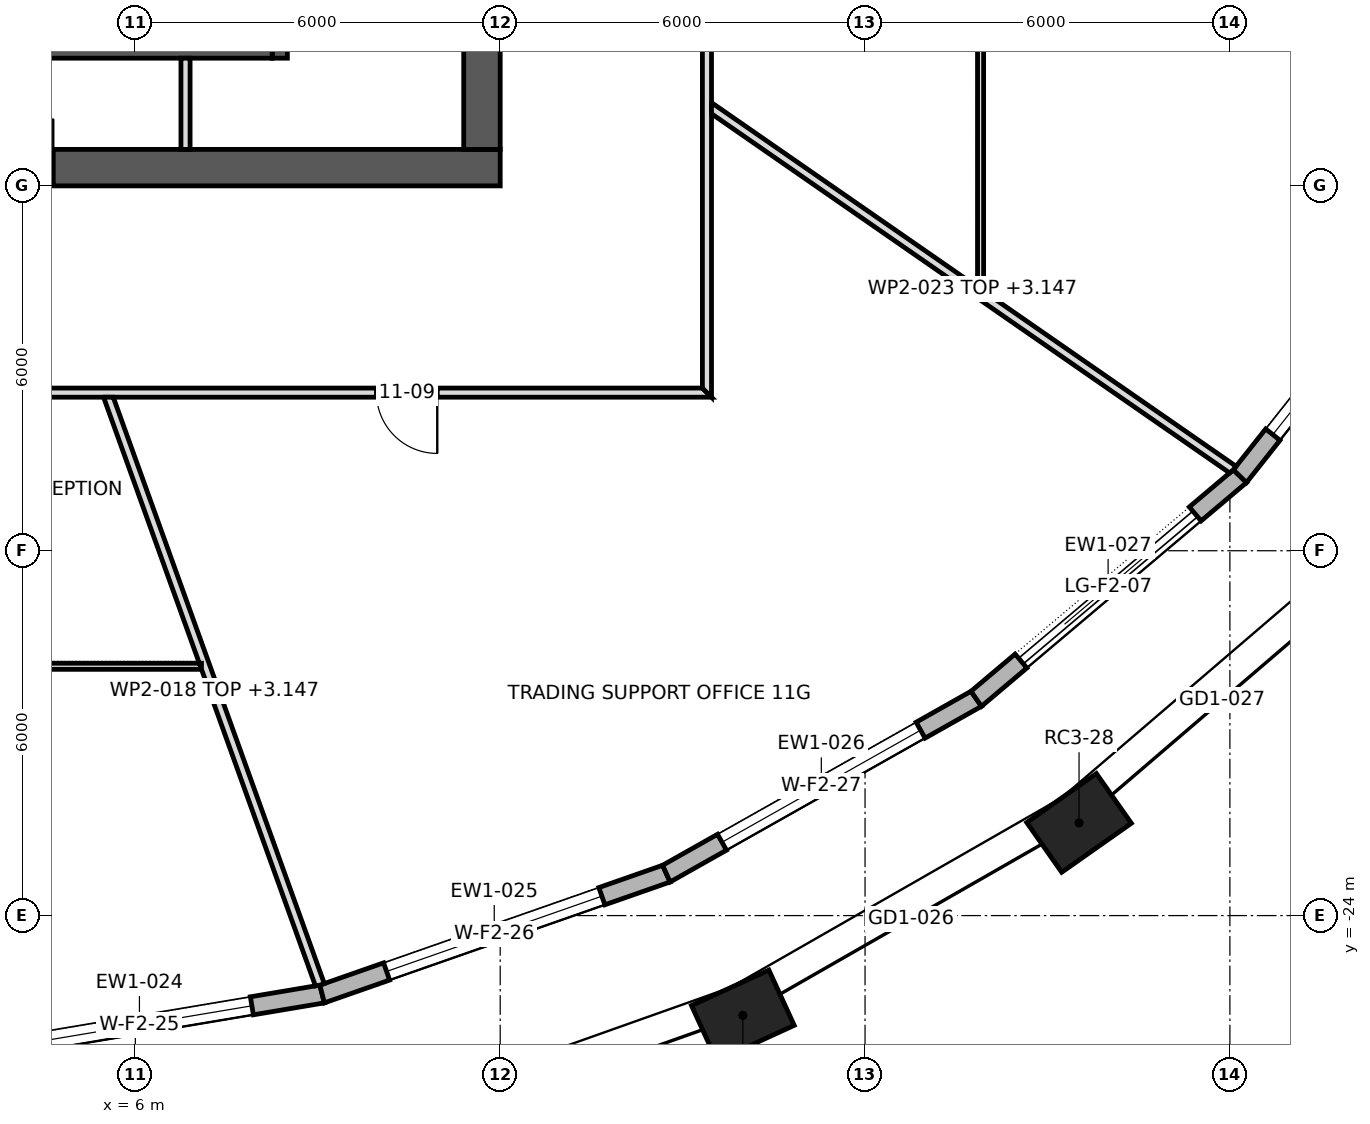
"""IFC4 building model, lengths in metres.
Left out: names, types, materials, properties, quantities, classifications, styles, units other than length and angle.
Written with IfcOpenShell. Run it as: python <this file> out.ifc"""

import sys

from ifc_helpers import new_model, si_unit, direction, frame, frame_2d, origin, origin_2d, place, context, subcontext, project, spatial, polyline, rectangle, outline, extrude, element, fill, save


model = new_model("IFC4")
c1 = context("Model", 3, precision=1e-05, world=origin(), true_north=direction((0.0, 1.0)))
c2 = subcontext(c1, "Body", "Model", "MODEL_VIEW")
j1 = project(units=[si_unit("LENGTHUNIT", "METRE"), si_unit("PLANEANGLEUNIT", "RADIAN")], contexts=[c1])
p1 = place(None, origin())
s1 = spatial("IfcSite", under=j1, at=p1, CompositionType="ELEMENT")
p2 = place(p1, origin())
s2 = spatial("IfcBuilding", under=s1, at=p2, CompositionType="ELEMENT")
p3 = place(p2, frame((0.0, 0.0, 154.9)))
s3 = spatial("IfcBuildingStorey", under=s2, at=p3, CompositionType="ELEMENT", Elevation=154.9)
for number, where, z_axis, x_axis in (
    (1, (15.99, -25.642, 0.0), (0.0, 0.0, 1.0), (0.909, 0.417, 0.0)),
    (2, (21.519, -22.475, 0.0), (0.0, 0.0, 1.0), (0.818, 0.575, 0.0)),
):
    element("IfcColumn", number, at=place(p3, frame(where, z_axis=z_axis, x_axis=x_axis)), inside=s3, PredefinedType="COLUMN", context=c2, shape_type="SweptSolid", body=[
        extrude(rectangle(XDim=1.4, YDim=1.0, at=origin_2d()), origin(), (0.0, 0.0, 1.0), 4.2),
    ])
p4 = place(p3, frame((-12.0, -11.7, 0.0), z_axis=(0.0, 0.0, 1.0), x_axis=(1.0, 0.0, 0.0)))
e3 = element("IfcWall", 3, at=p4, inside=s3, PredefinedType="SHEAR", context=c2, shape_type="SweptSolid", body=[
    extrude(rectangle(XDim=24.0, YDim=0.6, at=frame_2d((12.0, 0.0))), origin(), (0.0, 0.0, 1.0), 4.2),
])
p5 = place(p4, frame((9.975, 0.0, 0.0)))
e4 = element("IfcOpeningElement", 4, at=p5, cuts=e3, PredefinedType="OPENING", context=c2, shape_type="SweptSolid", body=[
    extrude(rectangle(XDim=0.9, YDim=2.1, at=frame_2d((0.45, 1.05))), frame((0.0, 0.312, 0.0), z_axis=(0.0, -1.0, 0.0), x_axis=(1.0, 0.0, 0.0)), (0.0, 0.0, 1.0), 0.624),
])
p6 = place(p4, frame((4.6, 0.0, 0.0)))
e5 = element("IfcOpeningElement", 5, at=p6, cuts=e3, PredefinedType="OPENING", context=c2, shape_type="SweptSolid", body=[
    extrude(rectangle(XDim=0.8, YDim=2.1, at=frame_2d((0.4, 1.05))), frame((0.0, 0.312, 0.0), z_axis=(0.0, -1.0, 0.0), x_axis=(1.0, 0.0, 0.0)), (0.0, 0.0, 1.0), 0.624),
])
p7 = place(p4, frame((7.0, 0.0, 0.0)))
e6 = element("IfcOpeningElement", 6, at=p7, cuts=e3, PredefinedType="OPENING", context=c2, shape_type="SweptSolid", body=[
    extrude(rectangle(XDim=0.8, YDim=2.1, at=frame_2d((0.4, 1.05))), frame((0.0, 0.312, 0.0), z_axis=(0.0, -1.0, 0.0), x_axis=(1.0, 0.0, 0.0)), (0.0, 0.0, 1.0), 0.624),
])
p8 = place(p4, frame((15.85, 0.0, 0.0)))
e7 = element("IfcOpeningElement", 7, at=p8, cuts=e3, PredefinedType="OPENING", context=c2, shape_type="SweptSolid", body=[
    extrude(rectangle(XDim=0.8, YDim=2.1, at=frame_2d((0.4, 1.05))), frame((0.0, 0.312, 0.0), z_axis=(0.0, -1.0, 0.0), x_axis=(1.0, 0.0, 0.0)), (0.0, 0.0, 1.0), 0.624),
])
p9 = place(p3, frame((11.7, -11.4, 0.0), z_axis=(0.0, 0.0, 1.0), x_axis=(0.0, 1.0, 0.0)))
e8 = element("IfcWall", 8, at=p9, inside=s3, PredefinedType="SHEAR", context=c2, shape_type="SweptSolid", body=[
    extrude(rectangle(XDim=22.8, YDim=0.6, at=frame_2d((11.4, 0.0))), origin(), (0.0, 0.0, 1.0), 4.2),
])
p10 = place(p9, frame((10.2, 0.0, 0.0)))
e9 = element("IfcOpeningElement", 9, at=p10, cuts=e8, PredefinedType="OPENING", context=c2, shape_type="SweptSolid", body=[
    extrude(rectangle(XDim=2.4, YDim=2.1, at=frame_2d((1.2, 1.05))), frame((0.0, 0.312, 0.0), z_axis=(0.0, -1.0, 0.0), x_axis=(1.0, 0.0, 0.0)), (0.0, 0.0, 1.0), 0.624),
])
p11 = place(p9, frame((19.5, 0.0, 0.0)))
e10 = element("IfcOpeningElement", 10, at=p11, cuts=e8, PredefinedType="OPENING", context=c2, shape_type="SweptSolid", body=[
    extrude(rectangle(XDim=1.2, YDim=2.1, at=frame_2d((0.6, 1.05))), frame((0.0, 0.312, 0.0), z_axis=(0.0, -1.0, 0.0), x_axis=(1.0, 0.0, 0.0)), (0.0, 0.0, 1.0), 0.624),
])
p12 = place(p9, frame((2.1, 0.0, 0.0)))
e11 = element("IfcOpeningElement", 11, at=p12, cuts=e8, PredefinedType="OPENING", context=c2, shape_type="SweptSolid", body=[
    extrude(rectangle(XDim=1.2, YDim=2.1, at=frame_2d((0.6, 1.05))), frame((0.0, 0.312, 0.0), z_axis=(0.0, -1.0, 0.0), x_axis=(1.0, 0.0, 0.0)), (0.0, 0.0, 1.0), 0.624),
])
p13 = place(p3, frame((3.063, -26.299, 0.0), z_axis=(0.0, 0.0, 1.0), x_axis=(0.98618955457, 0.165620537547, 0.0)))
e12 = element("IfcWall", 12, at=p13, inside=s3, PredefinedType="STANDARD", context=c2, shape_type="SweptSolid", body=[
    extrude(outline(polyline([(-0.012, -0.15), (6.105, -0.15), (6.08, 0.15), (0.012, 0.15), (-0.012, -0.15)])), origin(), (0.0, 0.0, 1.0), 3.9),
])
p14 = place(p13, frame((1.171, 0.0, 0.6)))
e13 = element("IfcOpeningElement", 13, at=p14, cuts=e12, PredefinedType="OPENING", context=c2, shape_type="SweptSolid", body=[
    extrude(rectangle(XDim=3.75, YDim=2.85, at=frame_2d((1.875, 1.425))), frame((0.0, 0.162, 0.0), z_axis=(0.0, -1.0, 0.0), x_axis=(1.0, 0.0, 0.0)), (0.0, 0.0, 1.0), 0.324),
])
p15 = place(p3, frame((9.071, -25.29, 0.0), z_axis=(0.0, 0.0, 1.0), x_axis=(0.943944636678, 0.330103806228, 0.0)))
e14 = element("IfcWall", 14, at=p15, inside=s3, PredefinedType="STANDARD", context=c2, shape_type="SweptSolid", body=[
    extrude(outline(polyline([(-0.013, -0.15), (6.011, -0.15), (5.984, 0.15), (0.013, 0.15), (-0.013, -0.15)])), origin(), (0.0, 0.0, 1.0), 3.9),
])
p16 = place(p15, frame((1.124, 0.0, 0.6)))
e15 = element("IfcOpeningElement", 15, at=p16, cuts=e14, PredefinedType="OPENING", context=c2, shape_type="SweptSolid", body=[
    extrude(rectangle(XDim=3.75, YDim=2.85, at=frame_2d((1.875, 1.425))), frame((0.0, 0.162, 0.0), z_axis=(0.0, -1.0, 0.0), x_axis=(1.0, 0.0, 0.0)), (0.0, 0.0, 1.0), 0.324),
])
p17 = place(p3, frame((14.732, -23.31, 0.0), z_axis=(0.0, 0.0, 1.0), x_axis=(0.870982130072, 0.491314694565, 0.0)))
e16 = element("IfcWall", 16, at=p17, inside=s3, PredefinedType="STANDARD", context=c2, shape_type="SweptSolid", body=[
    extrude(outline(polyline([(-0.013, -0.15), (5.866, -0.15), (5.837, 0.15), (0.013, 0.15), (-0.013, -0.15)])), origin(), (0.0, 0.0, 1.0), 3.9),
])
p18 = place(p17, frame((1.051, 0.0, 0.6)))
e17 = element("IfcOpeningElement", 17, at=p18, cuts=e16, PredefinedType="OPENING", context=c2, shape_type="SweptSolid", body=[
    extrude(rectangle(XDim=3.75, YDim=2.85, at=frame_2d((1.875, 1.425))), frame((0.0, 0.162, 0.0), z_axis=(0.0, -1.0, 0.0), x_axis=(1.0, 0.0, 0.0)), (0.0, 0.0, 1.0), 0.324),
])
p19 = place(p3, frame((19.829, -20.435, 0.0), z_axis=(0.0, 0.0, 1.0), x_axis=(0.764076096085, 0.645126126732, 0.0)))
e18 = element("IfcWall", 18, at=p19, inside=s3, PredefinedType="STANDARD", context=c2, shape_type="SweptSolid", body=[
    extrude(outline(polyline([(-0.014, -0.15), (5.69, -0.15), (5.66, 0.15), (0.014, 0.15), (-0.014, -0.15)])), origin(), (0.0, 0.0, 1.0), 3.9),
])
p20 = place(p19, frame((0.962, 0.0, 0.0)))
e19 = element("IfcOpeningElement", 19, at=p20, cuts=e18, PredefinedType="OPENING", context=c2, shape_type="SweptSolid", body=[
    extrude(rectangle(XDim=3.75, YDim=3.45, at=frame_2d((1.875, 1.725))), frame((0.0, 0.162, 0.0), z_axis=(0.0, -1.0, 0.0), x_axis=(1.0, 0.0, 0.0)), (0.0, 0.0, 1.0), 0.324),
])
p21 = place(p3, frame((24.165, -16.774, 0.0), z_axis=(0.0, 0.0, 1.0), x_axis=(0.620577705153, 0.784144955902, 0.0)))
e20 = element("IfcWall", 20, at=p21, inside=s3, PredefinedType="STANDARD", context=c2, shape_type="SweptSolid", body=[
    extrude(outline(polyline([(-0.015, -0.15), (5.509, -0.15), (5.477, 0.15), (0.015, 0.15), (-0.015, -0.15)])), origin(), (0.0, 0.0, 1.0), 3.9),
])
p22 = place(p21, frame((0.871, 0.0, 0.6)))
e21 = element("IfcOpeningElement", 21, at=p22, cuts=e20, PredefinedType="OPENING", context=c2, shape_type="SweptSolid", body=[
    extrude(rectangle(XDim=3.75, YDim=2.85, at=frame_2d((1.875, 1.425))), frame((0.0, 0.162, 0.0), z_axis=(0.0, -1.0, 0.0), x_axis=(1.0, 0.0, 0.0)), (0.0, 0.0, 1.0), 0.324),
])
p23 = place(p3, frame((8.375, -9.9, 0.0), z_axis=(0.0, 0.0, 1.0), x_axis=(0.0, 1.0, 0.0)))
e22 = element("IfcWall", 22, at=p23, inside=s3, PredefinedType="SHEAR", context=c2, shape_type="SweptSolid", body=[
    extrude(rectangle(XDim=3.4, YDim=0.25, at=frame_2d((1.7, 0.0))), origin(), (0.0, 0.0, 1.0), 3.9),
])
p24 = place(p23, frame((1.175, 0.0, 0.0)))
e23 = element("IfcOpeningElement", 23, at=p24, cuts=e22, PredefinedType="OPENING", context=c2, shape_type="SweptSolid", body=[
    extrude(rectangle(XDim=1.2, YDim=2.1, at=frame_2d((0.6, 1.05))), frame((0.0, 0.137, 0.0), z_axis=(0.0, -1.0, 0.0), x_axis=(1.0, 0.0, 0.0)), (0.0, 0.0, 1.0), 0.274),
])
p25 = place(p3, frame((0.25, -9.825, 0.0), z_axis=(0.0, 0.0, 1.0), x_axis=(1.0, 0.0, 0.0)))
e24 = element("IfcWall", 24, at=p25, inside=s3, PredefinedType="SHEAR", context=c2, shape_type="SweptSolid", body=[
    extrude(rectangle(XDim=8.0, YDim=0.15, at=frame_2d((4.0, 0.0))), origin(), (0.0, 0.0, 1.0), 3.9),
])
p26 = place(p3, frame((6.825, -11.4, 0.0), z_axis=(0.0, 0.0, 1.0), x_axis=(0.0, 1.0, 0.0)))
e25 = element("IfcWall", 25, at=p26, inside=s3, PredefinedType="PARTITIONING", context=c2, shape_type="SweptSolid", body=[
    extrude(rectangle(XDim=1.5, YDim=0.15, at=frame_2d((0.75, 0.0))), origin(), (0.0, 0.0, 1.0), 3.9),
])
p27 = place(p3, frame((-15.475, -15.4, 0.0), z_axis=(0.0, 0.0, 1.0), x_axis=(1.0, 0.0, 0.0)))
e26 = element("IfcWall", 26, at=p27, inside=s3, PredefinedType="PARTITIONING", context=c2, shape_type="SweptSolid", body=[
    extrude(outline(polyline([(0.0, -0.075), (1.935, -0.075), (3.869, -0.075), (5.803, -0.075), (7.738, -0.075), (9.672, -0.075), (11.606, -0.075), (13.541, -0.075), (15.475, -0.075), (17.409, -0.075), (19.344, -0.075), (21.278, -0.075), (23.212, -0.075), (25.147, -0.075), (27.081, -0.075), (29.016, -0.075), (30.95, -0.075), (30.8, 0.075), (28.885, 0.075), (26.969, 0.075), (25.053, 0.075), (23.138, 0.075), (21.222, 0.075), (19.306, 0.075), (17.391, 0.075), (15.475, 0.075), (13.56, 0.075), (11.644, 0.075), (9.728, 0.075), (7.812, 0.075), (5.897, 0.075), (3.981, 0.075), (2.066, 0.075), (0.15, 0.075), (0.0, -0.075)])), origin(), (0.0, 0.0, 1.0), 3.9),
])
p28 = place(p27, frame((11.785, 0.0, 0.0)))
e27 = element("IfcOpeningElement", 27, at=p28, cuts=e26, PredefinedType="OPENING", context=c2, shape_type="SweptSolid", body=[
    extrude(rectangle(XDim=1.0, YDim=2.1, at=frame_2d((0.5, 1.05))), frame((0.0, 0.087, 0.0), z_axis=(0.0, -1.0, 0.0), x_axis=(1.0, 0.0, 0.0)), (0.0, 0.0, 1.0), 0.174),
])
p29 = place(p27, frame((17.315, 0.0, 0.0)))
e28 = element("IfcOpeningElement", 28, at=p29, cuts=e26, PredefinedType="OPENING", context=c2, shape_type="SweptSolid", body=[
    extrude(rectangle(XDim=1.0, YDim=2.1, at=frame_2d((0.5, 1.05))), frame((0.0, 0.087, 0.0), z_axis=(0.0, -1.0, 0.0), x_axis=(1.0, 0.0, 0.0)), (0.0, 0.0, 1.0), 0.174),
])
p30 = place(p27, frame((25.44, 0.0, 0.0)))
e29 = element("IfcOpeningElement", 29, at=p30, cuts=e26, PredefinedType="OPENING", context=c2, shape_type="SweptSolid", body=[
    extrude(rectangle(XDim=1.0, YDim=2.1, at=frame_2d((0.5, 1.05))), frame((0.0, 0.087, 0.0), z_axis=(0.0, -1.0, 0.0), x_axis=(1.0, 0.0, 0.0)), (0.0, 0.0, 1.0), 0.174),
])
p31 = place(p3, frame((-7.087, -19.9, 0.0), z_axis=(0.0, 0.0, 1.0), x_axis=(1.0, 0.0, 0.0)))
e30 = element("IfcWall", 30, at=p31, inside=s3, PredefinedType="PARTITIONING", context=c2, shape_type="SweptSolid", body=[
    extrude(outline(polyline([(14.175, -0.05), (14.175, -0.049), (14.139, 0.05), (12.176, 0.05), (10.213, 0.05), (8.25, 0.05), (6.287, 0.05), (6.287, 0.05), (6.188, 0.05), (6.188, 0.05), (4.649, 0.05), (3.112, 0.05), (1.573, 0.05), (0.036, 0.05), (0.0, -0.049), (0.0, -0.05), (1.772, -0.05), (3.544, -0.05), (5.315, -0.05), (7.087, -0.05), (8.859, -0.05), (10.631, -0.05), (12.403, -0.05), (14.175, -0.05)])), origin(), (0.0, 0.0, 1.0), 3.9),
])
p32 = place(p31, frame((9.788, 0.0, 0.0)))
e31 = element("IfcOpeningElement", 31, at=p32, cuts=e30, PredefinedType="OPENING", context=c2, shape_type="SweptSolid", body=[
    extrude(rectangle(XDim=0.9, YDim=2.1, at=frame_2d((0.45, 1.05))), frame((0.0, 0.062, 0.0), z_axis=(0.0, -1.0, 0.0), x_axis=(1.0, 0.0, 0.0)), (0.0, 0.0, 1.0), 0.124),
])
p33 = place(p3, frame((5.548, -15.45, 0.0), z_axis=(0.0, 0.0, 1.0), x_axis=(0.338668278724, -0.940905838533, 0.0)))
e32 = element("IfcWall", 32, at=p33, inside=s3, PredefinedType="PARTITIONING", context=c2, shape_type="SweptSolid", body=[
    extrude(outline(polyline([(0.0, -0.075), (1.55, -0.075), (3.1, -0.075), (4.649, -0.075), (4.661, -0.042), (4.754, -0.075), (6.599, -0.075), (8.444, -0.075), (10.289, -0.075), (10.302, -0.003), (10.302, 0.064), (10.302, 0.075), (8.594, 0.075), (6.886, 0.075), (5.178, 0.075), (3.47, 0.075), (1.762, 0.075), (0.054, 0.075), (0.0, -0.074), (0.0, -0.075)])), origin(), (0.0, 0.0, 1.0), 3.147),
])
p34 = place(p3, frame((15.4, -15.475, 0.0), z_axis=(0.0, 0.0, 1.0), x_axis=(0.0, 1.0, 0.0)))
e33 = element("IfcWall", 33, at=p34, inside=s3, PredefinedType="PARTITIONING", context=c2, shape_type="SweptSolid", body=[
    extrude(outline(polyline([(0.0, -0.075), (1.935, -0.075), (3.869, -0.075), (5.803, -0.075), (7.738, -0.075), (9.672, -0.075), (11.606, -0.075), (13.541, -0.075), (15.475, -0.075), (17.409, -0.075), (19.344, -0.075), (21.278, -0.075), (23.212, -0.075), (25.147, -0.075), (27.081, -0.075), (29.016, -0.075), (30.95, -0.075), (30.8, 0.075), (28.885, 0.075), (26.969, 0.075), (25.053, 0.075), (23.138, 0.075), (21.222, 0.075), (19.306, 0.075), (17.391, 0.075), (15.475, 0.075), (13.56, 0.075), (11.644, 0.075), (9.728, 0.075), (7.812, 0.075), (5.897, 0.075), (3.981, 0.075), (2.066, 0.075), (0.15, 0.075), (0.0, -0.075)])), origin(), (0.0, 0.0, 1.0), 3.9),
])
p35 = place(p34, frame((9.0, 0.0, 0.0)))
e34 = element("IfcOpeningElement", 34, at=p35, cuts=e33, PredefinedType="OPENING", context=c2, shape_type="SweptSolid", body=[
    extrude(rectangle(XDim=1.0, YDim=2.1, at=frame_2d((0.5, 1.05))), frame((0.0, 0.087, 0.0), z_axis=(0.0, -1.0, 0.0), x_axis=(1.0, 0.0, 0.0)), (0.0, 0.0, 1.0), 0.174),
])
p36 = place(p34, frame((21.635, 0.0, 0.0)))
e35 = element("IfcOpeningElement", 35, at=p36, cuts=e33, PredefinedType="OPENING", context=c2, shape_type="SweptSolid", body=[
    extrude(rectangle(XDim=1.8, YDim=2.1, at=frame_2d((0.9, 1.05))), frame((0.0, 0.087, 0.0), z_axis=(0.0, -1.0, 0.0), x_axis=(1.0, 0.0, 0.0)), (0.0, 0.0, 1.0), 0.174),
])
p37 = place(p3, frame((15.433, -10.692, 0.0), z_axis=(0.0, 0.0, 1.0), x_axis=(0.821818585553, -0.569749254006, 0.0)))
e36 = element("IfcWall", 36, at=p37, inside=s3, PredefinedType="PARTITIONING", context=c2, shape_type="SweptSolid", body=[
    extrude(outline(polyline([(0.104, -0.075), (1.832, -0.075), (3.56, -0.075), (5.288, -0.075), (7.016, -0.075), (8.744, -0.075), (10.472, -0.075), (10.493, 0.002), (10.497, 0.072), (10.497, 0.075), (8.773, 0.075), (7.049, 0.075), (5.325, 0.075), (5.324, 0.074), (5.323, 0.075), (3.549, 0.075), (1.774, 0.075), (0.0, 0.075), (0.0, 0.074), (0.104, -0.075)])), origin(), (0.0, 0.0, 1.0), 3.147),
])
p38 = place(p3, frame((19.9, -1.726, 0.0), z_axis=(0.0, 0.0, 1.0), x_axis=(0.0, -1.0, 0.0)))
e37 = element("IfcWall", 37, at=p38, inside=s3, PredefinedType="PARTITIONING", context=c2, shape_type="SweptSolid", body=[
    extrude(outline(polyline([(0.0, -0.05), (1.99, -0.05), (3.979, -0.05), (5.969, -0.05), (7.959, -0.05), (9.948, -0.05), (11.938, -0.05), (12.007, 0.049), (12.007, 0.05), (10.007, 0.05), (8.007, 0.05), (6.007, 0.05), (4.008, 0.05), (2.008, 0.05), (0.008, 0.05), (0.0, -0.047), (0.0, -0.05)])), origin(), (0.0, 0.0, 1.0), 3.9),
])
p39 = place(p38, frame((5.544, 0.0, 0.0)))
e38 = element("IfcOpeningElement", 38, at=p39, cuts=e37, PredefinedType="OPENING", context=c2, shape_type="SweptSolid", body=[
    extrude(rectangle(XDim=0.9, YDim=2.1, at=frame_2d((0.45, 1.05))), frame((0.0, 0.062, 0.0), z_axis=(0.0, -1.0, 0.0), x_axis=(1.0, 0.0, 0.0)), (0.0, 0.0, 1.0), 0.124),
])
p40 = place(p14, origin())
e39 = element("IfcWindow", 39, at=p40, inside=s3, PartitioningType="TRIPLE_PANEL_VERTICAL", PredefinedType="WINDOW", context=c2, shape_type="SweptSolid", body=[
    extrude(rectangle(XDim=3.75, YDim=2.85, at=frame_2d((1.875, 1.425))), frame((0.0, 0.03, 0.0), z_axis=(0.0, -1.0, 0.0), x_axis=(1.0, 0.0, 0.0)), (0.0, 0.0, 1.0), 0.06),
])
fill(e13, e39)
p41 = place(p16, origin())
e40 = element("IfcWindow", 40, at=p41, inside=s3, PartitioningType="TRIPLE_PANEL_VERTICAL", PredefinedType="WINDOW", context=c2, shape_type="SweptSolid", body=[
    extrude(rectangle(XDim=3.75, YDim=2.85, at=frame_2d((1.875, 1.425))), frame((0.0, 0.03, 0.0), z_axis=(0.0, -1.0, 0.0), x_axis=(1.0, 0.0, 0.0)), (0.0, 0.0, 1.0), 0.06),
])
fill(e15, e40)
p42 = place(p18, origin())
e41 = element("IfcWindow", 41, at=p42, inside=s3, PartitioningType="TRIPLE_PANEL_VERTICAL", PredefinedType="WINDOW", context=c2, shape_type="SweptSolid", body=[
    extrude(rectangle(XDim=3.75, YDim=2.85, at=frame_2d((1.875, 1.425))), frame((0.0, 0.03, 0.0), z_axis=(0.0, -1.0, 0.0), x_axis=(1.0, 0.0, 0.0)), (0.0, 0.0, 1.0), 0.06),
])
fill(e17, e41)
p43 = place(p20, origin())
e42 = element("IfcDoor", 42, at=p43, inside=s3, OperationType="DOUBLE_DOOR_SLIDING", PredefinedType="DOOR", context=c2, shape_type="SweptSolid", body=[
    extrude(rectangle(XDim=3.75, YDim=3.45, at=frame_2d((1.875, 1.725))), frame((0.0, 0.025, 0.0), z_axis=(0.0, -1.0, 0.0), x_axis=(1.0, 0.0, 0.0)), (0.0, 0.0, 1.0), 0.05),
])
fill(e19, e42)
p44 = place(p22, origin())
e43 = element("IfcWindow", 43, at=p44, inside=s3, PartitioningType="TRIPLE_PANEL_VERTICAL", PredefinedType="WINDOW", context=c2, shape_type="SweptSolid", body=[
    extrude(rectangle(XDim=3.75, YDim=2.85, at=frame_2d((1.875, 1.425))), frame((0.0, 0.03, 0.0), z_axis=(0.0, -1.0, 0.0), x_axis=(1.0, 0.0, 0.0)), (0.0, 0.0, 1.0), 0.06),
])
fill(e21, e43)
p45 = place(p8, origin())
e44 = element("IfcDoor", 44, at=p45, inside=s3, OperationType="SINGLE_SWING_LEFT", PredefinedType="DOOR", context=c2, shape_type="SweptSolid", body=[
    extrude(rectangle(XDim=0.8, YDim=2.1, at=frame_2d((0.4, 1.05))), frame((0.0, 0.025, 0.0), z_axis=(0.0, -1.0, 0.0), x_axis=(1.0, 0.0, 0.0)), (0.0, 0.0, 1.0), 0.05),
])
fill(e7, e44)
p46 = place(p30, frame((1.0, 0.0, 0.0), z_axis=(0.0, 0.0, 1.0), x_axis=(-1.0, 0.0, 0.0)))
e45 = element("IfcDoor", 45, at=p46, inside=s3, OperationType="SINGLE_SWING_RIGHT", PredefinedType="DOOR", context=c2, shape_type="SweptSolid", body=[
    extrude(rectangle(XDim=1.0, YDim=2.1, at=frame_2d((0.5, 1.05))), frame((0.0, 0.025, 0.0), z_axis=(0.0, -1.0, 0.0), x_axis=(1.0, 0.0, 0.0)), (0.0, 0.0, 1.0), 0.05),
])
fill(e29, e45)
save(model, sys.argv[1])
